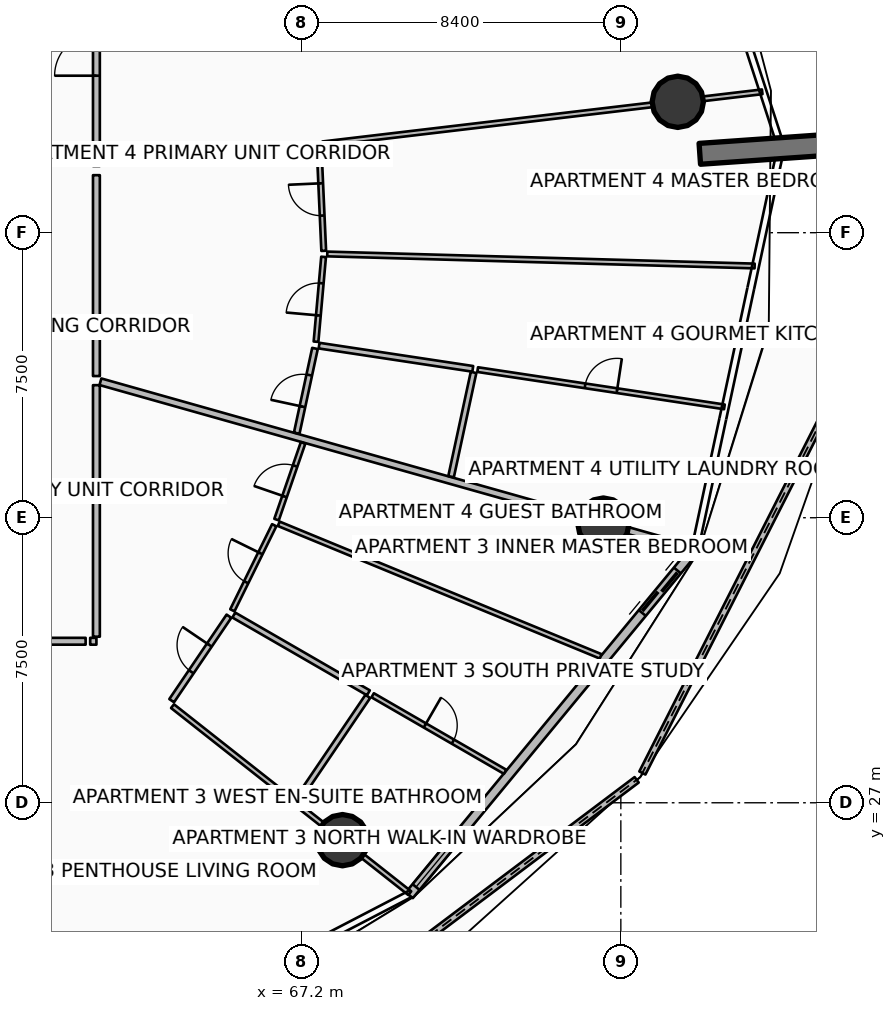
"""IFC4 building model, lengths in metres.
Left out: names, types, materials, properties, quantities, classifications, styles, units other than length and angle.
Written with IfcOpenShell. Run it as: python <this file> out.ifc"""

import sys

from ifc_helpers import new_model, si_unit, direction, frame, frame_2d, origin, origin_2d, place, context, subcontext, project, spatial, polyline, rectangle, circle, outline, extrude, element, fill, save


model = new_model("IFC4")
c1 = context("Model", 3, precision=1e-05, world=origin(), true_north=direction((0.0, 1.0)))
c2 = subcontext(c1, "Body", "Model", "MODEL_VIEW")
j1 = project(units=[si_unit("LENGTHUNIT", "METRE"), si_unit("PLANEANGLEUNIT", "RADIAN")], contexts=[c1])
p1 = place(None, origin())
s1 = spatial("IfcSite", under=j1, at=p1, CompositionType="ELEMENT")
p2 = place(p1, origin())
s2 = spatial("IfcBuilding", under=s1, at=p2, CompositionType="ELEMENT")
p3 = place(p2, frame((0.0, 0.0, 52.65)))
s3 = spatial("IfcBuildingStorey", under=s2, at=p3, CompositionType="ELEMENT", Elevation=52.65)
p4 = place(p3, frame((77.678, 44.075, 0.0), z_axis=(0.0, 0.0, 1.0), x_axis=(0.997564163539, 0.069754853754, 0.0)))
e1 = element("IfcWall", 1, at=p4, inside=s3, PredefinedType="SOLIDWALL", context=c2, shape_type="SweptSolid", body=[
    extrude(rectangle(XDim=3.5, YDim=0.55, at=frame_2d((1.75, 0.0))), origin(), (0.0, 0.0, 1.0), 3.75),
])
for number, where, z_axis, x_axis in (
    (2, (68.276, 26.016, 0.0), (0.0, 0.0, 1.0), (1.0, 0.0, 0.0)),
    (3, (75.141, 34.345, 0.0), (0.0, 0.0, 1.0), (1.0, 0.0, 0.0)),
    (4, (77.098, 45.444, 0.0), (0.0, 0.0, 1.0), (1.0, 0.0, 0.0)),
):
    element("IfcColumn", number, at=place(p3, frame(where, z_axis=z_axis, x_axis=x_axis)), inside=s3, PredefinedType="COLUMN", context=c2, shape_type="SweptSolid", body=[
        extrude(circle(Radius=0.675, at=origin_2d()), origin(), (0.0, 0.0, 1.0), 3.5),
    ])
p5 = place(p3, frame((66.587, 20.505, 0.0), z_axis=(0.0, 0.0, 1.0), x_axis=(0.798916487869, 0.601441971773, 0.0)))
e5 = element("IfcWall", 5, at=p5, inside=s3, PredefinedType="PARAPET", context=c2, shape_type="SweptSolid", body=[
    extrude(outline(polyline([(0.0, 0.0), (11.803, 0.0), (11.803, 1.348), (5.902, 1.182), (0.0, 1.12), (0.0, 0.0)])), frame((0.0, 0.09, 0.0), z_axis=(0.0, -1.0, 0.0), x_axis=(1.0, 0.0, 0.0)), (0.0, 0.0, 1.0), 0.18),
])
p6 = place(p3, frame((76.167, 27.783, 0.0), z_axis=(0.0, 0.0, 1.0), x_axis=(0.452795448166, 0.891614424581, 0.0)))
e6 = element("IfcWall", 6, at=p6, inside=s3, PredefinedType="PARAPET", context=c2, shape_type="SweptSolid", body=[
    extrude(outline(polyline([(0.0, 0.0), (12.717, 0.0), (12.717, 1.747), (6.358, 1.562), (0.0, 1.348), (0.0, 0.0)])), frame((0.0, 0.09, 0.0), z_axis=(0.0, -1.0, 0.0), x_axis=(1.0, 0.0, 0.0)), (0.0, 0.0, 1.0), 0.18),
])
p7 = place(p3, frame((70.033, 24.567, 0.0), z_axis=(0.0, 0.0, 1.0), x_axis=(0.636674332663, 0.771132799281, 0.0)))
e7 = element("IfcWall", 7, at=p7, inside=s3, PredefinedType="SOLIDWALL", context=c2, shape_type="SweptSolid", body=[
    extrude(rectangle(XDim=11.851, YDim=0.24, at=frame_2d((5.926, 0.0))), origin(), (0.0, 0.0, 1.0), 2.45),
])
p8 = place(p7, frame((9.631, 0.0, 0.0)))
e8 = element("IfcOpeningElement", 8, at=p8, cuts=e7, PredefinedType="OPENING", context=c2, shape_type="SweptSolid", body=[
    extrude(rectangle(XDim=1.45, YDim=2.15, at=frame_2d((0.725, 1.075))), frame((0.0, 0.13, 0.0), z_axis=(0.0, -1.0, 0.0), x_axis=(1.0, 0.0, 0.0)), (0.0, 0.0, 1.0), 0.26),
])
p9 = place(p7, frame((0.28, 0.0, 0.65)))
e9 = element("IfcOpeningElement", 9, at=p9, cuts=e7, PredefinedType="OPENING", context=c2, shape_type="SweptSolid", body=[
    extrude(rectangle(XDim=1.6, YDim=1.5, at=frame_2d((0.8, 0.75))), frame((0.0, 0.13, 0.0), z_axis=(0.0, -1.0, 0.0), x_axis=(1.0, 0.0, 0.0)), (0.0, 0.0, 1.0), 0.26),
])
p10 = place(p3, frame((61.906, 38.078, 0.0), z_axis=(0.0, 0.0, 1.0), x_axis=(0.962455862511, -0.271438230022, 0.0)))
e10 = element("IfcWall", 10, at=p10, inside=s3, PredefinedType="PARTITIONING", context=c2, shape_type="SweptSolid", body=[
    extrude(rectangle(XDim=16.126, YDim=0.18, at=frame_2d((8.063, 0.0))), origin(), (0.0, 0.0, 1.0), 2.867),
])
p11 = place(p3, frame((54.14, 31.25, 0.0), z_axis=(0.0, 0.0, 1.0), x_axis=(1.0, 0.0, 0.0)))
e11 = element("IfcWall", 11, at=p11, inside=s3, PredefinedType="PARTITIONING", context=c2, shape_type="SweptSolid", body=[
    extrude(rectangle(XDim=7.376, YDim=0.18, at=frame_2d((3.688, 0.0))), origin(), (0.0, 0.0, 1.0), 2.867),
])
p12 = place(p11, frame((3.138, 0.0, 0.0)))
e12 = element("IfcOpeningElement", 12, at=p12, cuts=e11, PredefinedType="OPENING", context=c2, shape_type="SweptSolid", body=[
    extrude(rectangle(XDim=1.1, YDim=2.1, at=frame_2d((0.55, 1.05))), frame((0.0, 0.1, 0.0), z_axis=(0.0, -1.0, 0.0), x_axis=(1.0, 0.0, 0.0)), (0.0, 0.0, 1.0), 0.2),
])
p13 = place(p3, frame((61.636, 31.25, 0.0), z_axis=(0.0, 0.0, 1.0), x_axis=(1.0, 0.0, 0.0)))
e13 = element("IfcWall", 13, at=p13, inside=s3, PredefinedType="PARTITIONING", context=c2, shape_type="SweptSolid", body=[
    extrude(rectangle(XDim=0.164, YDim=0.18, at=frame_2d((0.082, 0.0))), origin(), (0.0, 0.0, 1.0), 2.867),
])
p14 = place(p3, frame((61.8, 31.37, 0.0), z_axis=(0.0, 0.0, 1.0), x_axis=(0.0, 1.0, 0.0)))
e14 = element("IfcWall", 14, at=p14, inside=s3, PredefinedType="PARTITIONING", context=c2, shape_type="SweptSolid", body=[
    extrude(rectangle(XDim=6.618, YDim=0.18, at=frame_2d((3.309, 0.0))), origin(), (0.0, 0.0, 1.0), 2.867),
])
p15 = place(p3, frame((63.803, 29.542, 0.0), z_axis=(0.0, 0.0, 1.0), x_axis=(0.785316547054, -0.619094436191, 0.0)))
e15 = element("IfcWall", 15, at=p15, inside=s3, PredefinedType="PARTITIONING", context=c2, shape_type="SweptSolid", body=[
    extrude(rectangle(XDim=7.949, YDim=0.125, at=frame_2d((3.975, 0.0))), origin(), (0.0, 0.0, 1.0), 2.867),
])
p16 = place(p3, frame((63.781, 29.687, 0.0), z_axis=(0.0, 0.0, 1.0), x_axis=(0.561145635053, 0.82771708709, 0.0)))
e16 = element("IfcWall", 16, at=p16, inside=s3, PredefinedType="PARTITIONING", context=c2, shape_type="SweptSolid", body=[
    extrude(rectangle(XDim=2.685, YDim=0.15, at=frame_2d((1.343, 0.0))), origin(), (0.0, 0.0, 1.0), 2.867),
])
p17 = place(p16, frame((0.918, 0.0, 0.0)))
e17 = element("IfcOpeningElement", 17, at=p17, cuts=e16, PredefinedType="OPENING", context=c2, shape_type="SweptSolid", body=[
    extrude(rectangle(XDim=0.85, YDim=2.06, at=frame_2d((0.425, 1.03))), frame((0.0, 0.085, 0.0), z_axis=(0.0, -1.0, 0.0), x_axis=(1.0, 0.0, 0.0)), (0.0, 0.0, 1.0), 0.17),
])
p18 = place(p3, frame((67.094, 27.074, 0.0), z_axis=(0.0, 0.0, 1.0), x_axis=(0.561136770773, 0.827723096504, 0.0)))
e18 = element("IfcWall", 18, at=p18, inside=s3, PredefinedType="PARTITIONING", context=c2, shape_type="SweptSolid", body=[
    extrude(rectangle(XDim=3.292, YDim=0.15, at=frame_2d((1.646, 0.0))), origin(), (0.0, 0.0, 1.0), 2.867),
])
p19 = place(p3, frame((65.416, 31.939, 0.0), z_axis=(0.0, 0.0, 1.0), x_axis=(0.865897249189, -0.500221904605, 0.0)))
e19 = element("IfcWall", 19, at=p19, inside=s3, PredefinedType="PARTITIONING", context=c2, shape_type="SweptSolid", body=[
    extrude(rectangle(XDim=4.09, YDim=0.15, at=frame_2d((2.045, 0.0))), origin(), (0.0, 0.0, 1.0), 2.94),
])
p20 = place(p3, frame((69.07, 29.828, 0.0), z_axis=(0.0, 0.0, 1.0), x_axis=(0.865911782311, -0.500196746546, 0.0)))
e20 = element("IfcWall", 20, at=p20, inside=s3, PredefinedType="PARTITIONING", context=c2, shape_type="SweptSolid", body=[
    extrude(rectangle(XDim=4.025, YDim=0.125, at=frame_2d((2.012, 0.0))), origin(), (0.0, 0.0, 1.0), 2.94),
])
p21 = place(p20, frame((1.587, 0.0, 0.0)))
e21 = element("IfcOpeningElement", 21, at=p21, cuts=e20, PredefinedType="OPENING", context=c2, shape_type="SweptSolid", body=[
    extrude(rectangle(XDim=0.85, YDim=2.06, at=frame_2d((0.425, 1.03))), frame((0.0, 0.073, 0.0), z_axis=(0.0, -1.0, 0.0), x_axis=(1.0, 0.0, 0.0)), (0.0, 0.0, 1.0), 0.145),
])
p22 = place(p3, frame((66.598, 34.341, 0.0), z_axis=(0.0, 0.0, 1.0), x_axis=(0.9246609872, -0.380791358556, 0.0)))
e22 = element("IfcWall", 22, at=p22, inside=s3, PredefinedType="PARTITIONING", context=c2, shape_type="SweptSolid", body=[
    extrude(rectangle(XDim=9.161, YDim=0.125, at=frame_2d((4.58, 0.0))), origin(), (0.0, 0.0, 1.0), 2.94),
])
p23 = place(p3, frame((65.377, 32.065, 0.0), z_axis=(0.0, 0.0, 1.0), x_axis=(0.441490145673, 0.897266098364, 0.0)))
e23 = element("IfcWall", 23, at=p23, inside=s3, PredefinedType="PARTITIONING", context=c2, shape_type="SweptSolid", body=[
    extrude(rectangle(XDim=2.495, YDim=0.125, at=frame_2d((1.248, 0.0))), origin(), (0.0, 0.0, 1.0), 2.94),
])
p24 = place(p23, frame((0.823, 0.0, 0.0)))
e24 = element("IfcOpeningElement", 24, at=p24, cuts=e23, PredefinedType="OPENING", context=c2, shape_type="SweptSolid", body=[
    extrude(rectangle(XDim=0.85, YDim=2.06, at=frame_2d((0.425, 1.03))), frame((0.0, 0.073, 0.0), z_axis=(0.0, -1.0, 0.0), x_axis=(1.0, 0.0, 0.0)), (0.0, 0.0, 1.0), 0.145),
])
p25 = place(p3, frame((66.541, 34.451, 0.0), z_axis=(0.0, 0.0, 1.0), x_axis=(0.326627883033, 0.945153017255, 0.0)))
e25 = element("IfcWall", 25, at=p25, inside=s3, PredefinedType="PARTITIONING", context=c2, shape_type="SweptSolid", body=[
    extrude(rectangle(XDim=2.137, YDim=0.125, at=frame_2d((1.068, 0.0))), origin(), (0.0, 0.0, 1.0), 2.867),
])
p26 = place(p25, frame((0.643, 0.0, 0.0)))
e26 = element("IfcOpeningElement", 26, at=p26, cuts=e25, PredefinedType="OPENING", context=c2, shape_type="SweptSolid", body=[
    extrude(rectangle(XDim=0.85, YDim=2.06, at=frame_2d((0.425, 1.03))), frame((0.0, 0.073, 0.0), z_axis=(0.0, -1.0, 0.0), x_axis=(1.0, 0.0, 0.0)), (0.0, 0.0, 1.0), 0.145),
])
p27 = place(p3, frame((61.8, 43.753, 0.0), z_axis=(0.0, 0.0, 1.0), x_axis=(0.0, 1.0, 0.0)))
e27 = element("IfcWall", 27, at=p27, inside=s3, PredefinedType="PARTITIONING", context=c2, shape_type="SweptSolid", body=[
    extrude(rectangle(XDim=5.855, YDim=0.18, at=frame_2d((2.927, 0.0))), origin(), (0.0, 0.0, 1.0), 2.867),
])
p28 = place(p27, frame((2.378, 0.0, 0.0)))
e28 = element("IfcOpeningElement", 28, at=p28, cuts=e27, PredefinedType="OPENING", context=c2, shape_type="SweptSolid", body=[
    extrude(rectangle(XDim=1.1, YDim=2.1, at=frame_2d((0.55, 1.05))), frame((0.0, 0.1, 0.0), z_axis=(0.0, -1.0, 0.0), x_axis=(1.0, 0.0, 0.0)), (0.0, 0.0, 1.0), 0.2),
])
p29 = place(p3, frame((61.8, 38.228, 0.0), z_axis=(0.0, 0.0, 1.0), x_axis=(0.0, 1.0, 0.0)))
e29 = element("IfcWall", 29, at=p29, inside=s3, PredefinedType="PARTITIONING", context=c2, shape_type="SweptSolid", body=[
    extrude(rectangle(XDim=5.285, YDim=0.18, at=frame_2d((2.643, 0.0))), origin(), (0.0, 0.0, 1.0), 2.867),
])
p30 = place(p3, frame((67.755, 44.338, 0.0), z_axis=(0.0, 0.0, 1.0), x_axis=(0.993067500076, 0.117545481801, 0.0)))
e30 = element("IfcWall", 30, at=p30, inside=s3, PredefinedType="PARTITIONING", context=c2, shape_type="SweptSolid", body=[
    extrude(rectangle(XDim=11.646, YDim=0.125, at=frame_2d((5.823, 0.0))), origin(), (0.0, 0.0, 1.0), 2.867),
])
p31 = place(p3, frame((67.071, 36.725, 0.0), z_axis=(0.0, 0.0, 1.0), x_axis=(0.210815805763, 0.977525803261, 0.0)))
e31 = element("IfcWall", 31, at=p31, inside=s3, PredefinedType="PARTITIONING", context=c2, shape_type="SweptSolid", body=[
    extrude(rectangle(XDim=2.28, YDim=0.15, at=frame_2d((1.14, 0.0))), origin(), (0.0, 0.0, 1.0), 2.867),
])
p32 = place(p31, frame((0.715, 0.0, 0.0)))
e32 = element("IfcOpeningElement", 32, at=p32, cuts=e31, PredefinedType="OPENING", context=c2, shape_type="SweptSolid", body=[
    extrude(rectangle(XDim=0.85, YDim=2.06, at=frame_2d((0.425, 1.03))), frame((0.0, 0.085, 0.0), z_axis=(0.0, -1.0, 0.0), x_axis=(1.0, 0.0, 0.0)), (0.0, 0.0, 1.0), 0.17),
])
p33 = place(p3, frame((71.133, 35.58, 0.0), z_axis=(0.0, 0.0, 1.0), x_axis=(0.21084765068, 0.977518934959, 0.0)))
e33 = element("IfcWall", 33, at=p33, inside=s3, PredefinedType="PARTITIONING", context=c2, shape_type="SweptSolid", body=[
    extrude(rectangle(XDim=2.807, YDim=0.15, at=frame_2d((1.403, 0.0))), origin(), (0.0, 0.0, 1.0), 2.867),
])
p34 = place(p3, frame((67.66, 39.029, 0.0), z_axis=(0.0, 0.0, 1.0), x_axis=(0.988765818212, -0.149472929776, 0.0)))
e34 = element("IfcWall", 34, at=p34, inside=s3, PredefinedType="PARTITIONING", context=c2, shape_type="SweptSolid", body=[
    extrude(rectangle(XDim=4.09, YDim=0.15, at=frame_2d((2.045, 0.0))), origin(), (0.0, 0.0, 1.0), 2.94),
])
p35 = place(p3, frame((71.832, 38.398, 0.0), z_axis=(0.0, 0.0, 1.0), x_axis=(0.988773501149, -0.149422098181, 0.0)))
e35 = element("IfcWall", 35, at=p35, inside=s3, PredefinedType="PARTITIONING", context=c2, shape_type="SweptSolid", body=[
    extrude(rectangle(XDim=6.567, YDim=0.125, at=frame_2d((3.283, 0.0))), origin(), (0.0, 0.0, 1.0), 2.94),
])
p36 = place(p35, frame((2.858, 0.0, 0.0)))
e36 = element("IfcOpeningElement", 36, at=p36, cuts=e35, PredefinedType="OPENING", context=c2, shape_type="SweptSolid", body=[
    extrude(rectangle(XDim=0.85, YDim=2.06, at=frame_2d((0.425, 1.03))), frame((0.0, 0.073, 0.0), z_axis=(0.0, -1.0, 0.0), x_axis=(1.0, 0.0, 0.0)), (0.0, 0.0, 1.0), 0.145),
])
p37 = place(p3, frame((67.875, 41.44, 0.0), z_axis=(0.0, 0.0, 1.0), x_axis=(0.999604383534, -0.028126080787, 0.0)))
e37 = element("IfcWall", 37, at=p37, inside=s3, PredefinedType="PARTITIONING", context=c2, shape_type="SweptSolid", body=[
    extrude(rectangle(XDim=11.25, YDim=0.125, at=frame_2d((5.625, 0.0))), origin(), (0.0, 0.0, 1.0), 2.94),
])
p38 = place(p3, frame((67.579, 39.132, 0.0), z_axis=(0.0, 0.0, 1.0), x_axis=(0.089032328007, 0.996028736819, 0.0)))
e38 = element("IfcWall", 38, at=p38, inside=s3, PredefinedType="PARTITIONING", context=c2, shape_type="SweptSolid", body=[
    extrude(rectangle(XDim=2.24, YDim=0.125, at=frame_2d((1.12, 0.0))), origin(), (0.0, 0.0, 1.0), 2.94),
])
p39 = place(p38, frame((0.695, 0.0, 0.0)))
e39 = element("IfcOpeningElement", 39, at=p39, cuts=e38, PredefinedType="OPENING", context=c2, shape_type="SweptSolid", body=[
    extrude(rectangle(XDim=0.85, YDim=2.06, at=frame_2d((0.425, 1.03))), frame((0.0, 0.073, 0.0), z_axis=(0.0, -1.0, 0.0), x_axis=(1.0, 0.0, 0.0)), (0.0, 0.0, 1.0), 0.145),
])
p40 = place(p3, frame((67.781, 41.523, 0.0), z_axis=(0.0, 0.0, 1.0), x_axis=(-0.044740706283, 0.998998633233, 0.0)))
e40 = element("IfcWall", 40, at=p40, inside=s3, PredefinedType="PARTITIONING", context=c2, shape_type="SweptSolid", body=[
    extrude(rectangle(XDim=2.707, YDim=0.125, at=frame_2d((1.353, 0.0))), origin(), (0.0, 0.0, 1.0), 2.867),
])
p41 = place(p40, frame((0.928, 0.0, 0.0)))
e41 = element("IfcOpeningElement", 41, at=p41, cuts=e40, PredefinedType="OPENING", context=c2, shape_type="SweptSolid", body=[
    extrude(rectangle(XDim=0.85, YDim=2.06, at=frame_2d((0.425, 1.03))), frame((0.0, 0.073, 0.0), z_axis=(0.0, -1.0, 0.0), x_axis=(1.0, 0.0, 0.0)), (0.0, 0.0, 1.0), 0.145),
])
p42 = place(p8, origin())
e42 = element("IfcDoor", 42, at=p42, inside=s3, OperationType="DOUBLE_DOOR_SLIDING", PredefinedType="DOOR", context=c2, shape_type="SweptSolid", body=[
    extrude(rectangle(XDim=1.45, YDim=2.15, at=frame_2d((0.725, 1.075))), frame((0.0, 0.025, 0.0), z_axis=(0.0, -1.0, 0.0), x_axis=(1.0, 0.0, 0.0)), (0.0, 0.0, 1.0), 0.05),
])
fill(e8, e42)
p43 = place(p9, origin())
e43 = element("IfcWindow", 43, at=p43, inside=s3, PartitioningType="SINGLE_PANEL", PredefinedType="WINDOW", context=c2, shape_type="SweptSolid", body=[
    extrude(rectangle(XDim=1.6, YDim=1.5, at=frame_2d((0.8, 0.75))), frame((0.0, 0.03, 0.0), z_axis=(0.0, -1.0, 0.0), x_axis=(1.0, 0.0, 0.0)), (0.0, 0.0, 1.0), 0.06),
])
fill(e9, e43)
p44 = place(p17, origin())
e44 = element("IfcDoor", 44, at=p44, inside=s3, OperationType="SINGLE_SWING_RIGHT", PredefinedType="DOOR", context=c2, shape_type="SweptSolid", body=[
    extrude(rectangle(XDim=0.85, YDim=2.06, at=frame_2d((0.425, 1.03))), frame((0.0, 0.025, 0.0), z_axis=(0.0, -1.0, 0.0), x_axis=(1.0, 0.0, 0.0)), (0.0, 0.0, 1.0), 0.05),
])
fill(e17, e44)
p45 = place(p21, origin())
e45 = element("IfcDoor", 45, at=p45, inside=s3, OperationType="SINGLE_SWING_LEFT", PredefinedType="DOOR", context=c2, shape_type="SweptSolid", body=[
    extrude(rectangle(XDim=0.85, YDim=2.06, at=frame_2d((0.425, 1.03))), frame((0.0, 0.025, 0.0), z_axis=(0.0, -1.0, 0.0), x_axis=(1.0, 0.0, 0.0)), (0.0, 0.0, 1.0), 0.05),
])
fill(e21, e45)
p46 = place(p24, origin())
e46 = element("IfcDoor", 46, at=p46, inside=s3, OperationType="SINGLE_SWING_RIGHT", PredefinedType="DOOR", context=c2, shape_type="SweptSolid", body=[
    extrude(rectangle(XDim=0.85, YDim=2.06, at=frame_2d((0.425, 1.03))), frame((0.0, 0.025, 0.0), z_axis=(0.0, -1.0, 0.0), x_axis=(1.0, 0.0, 0.0)), (0.0, 0.0, 1.0), 0.05),
])
fill(e24, e46)
p47 = place(p26, origin())
e47 = element("IfcDoor", 47, at=p47, inside=s3, OperationType="SINGLE_SWING_LEFT", PredefinedType="DOOR", context=c2, shape_type="SweptSolid", body=[
    extrude(rectangle(XDim=0.85, YDim=2.06, at=frame_2d((0.425, 1.03))), frame((0.0, 0.025, 0.0), z_axis=(0.0, -1.0, 0.0), x_axis=(1.0, 0.0, 0.0)), (0.0, 0.0, 1.0), 0.05),
])
fill(e26, e47)
p48 = place(p28, origin())
e48 = element("IfcDoor", 48, at=p48, inside=s3, OperationType="SINGLE_SWING_LEFT", PredefinedType="DOOR", context=c2, shape_type="SweptSolid", body=[
    extrude(rectangle(XDim=1.1, YDim=2.1, at=frame_2d((0.55, 1.05))), frame((0.0, 0.025, 0.0), z_axis=(0.0, -1.0, 0.0), x_axis=(1.0, 0.0, 0.0)), (0.0, 0.0, 1.0), 0.05),
])
fill(e28, e48)
p49 = place(p32, origin())
e49 = element("IfcDoor", 49, at=p49, inside=s3, OperationType="SINGLE_SWING_LEFT", PredefinedType="DOOR", context=c2, shape_type="SweptSolid", body=[
    extrude(rectangle(XDim=0.85, YDim=2.06, at=frame_2d((0.425, 1.03))), frame((0.0, 0.025, 0.0), z_axis=(0.0, -1.0, 0.0), x_axis=(1.0, 0.0, 0.0)), (0.0, 0.0, 1.0), 0.05),
])
fill(e32, e49)
p50 = place(p36, origin())
e50 = element("IfcDoor", 50, at=p50, inside=s3, OperationType="SINGLE_SWING_RIGHT", PredefinedType="DOOR", context=c2, shape_type="SweptSolid", body=[
    extrude(rectangle(XDim=0.85, YDim=2.06, at=frame_2d((0.425, 1.03))), frame((0.0, 0.025, 0.0), z_axis=(0.0, -1.0, 0.0), x_axis=(1.0, 0.0, 0.0)), (0.0, 0.0, 1.0), 0.05),
])
fill(e36, e50)
p51 = place(p39, origin())
e51 = element("IfcDoor", 51, at=p51, inside=s3, OperationType="SINGLE_SWING_LEFT", PredefinedType="DOOR", context=c2, shape_type="SweptSolid", body=[
    extrude(rectangle(XDim=0.85, YDim=2.06, at=frame_2d((0.425, 1.03))), frame((0.0, 0.025, 0.0), z_axis=(0.0, -1.0, 0.0), x_axis=(1.0, 0.0, 0.0)), (0.0, 0.0, 1.0), 0.05),
])
fill(e39, e51)
p52 = place(p41, origin())
e52 = element("IfcDoor", 52, at=p52, inside=s3, OperationType="SINGLE_SWING_RIGHT", PredefinedType="DOOR", context=c2, shape_type="SweptSolid", body=[
    extrude(rectangle(XDim=0.85, YDim=2.06, at=frame_2d((0.425, 1.03))), frame((0.0, 0.025, 0.0), z_axis=(0.0, -1.0, 0.0), x_axis=(1.0, 0.0, 0.0)), (0.0, 0.0, 1.0), 0.05),
])
fill(e41, e52)
save(model, sys.argv[1])
